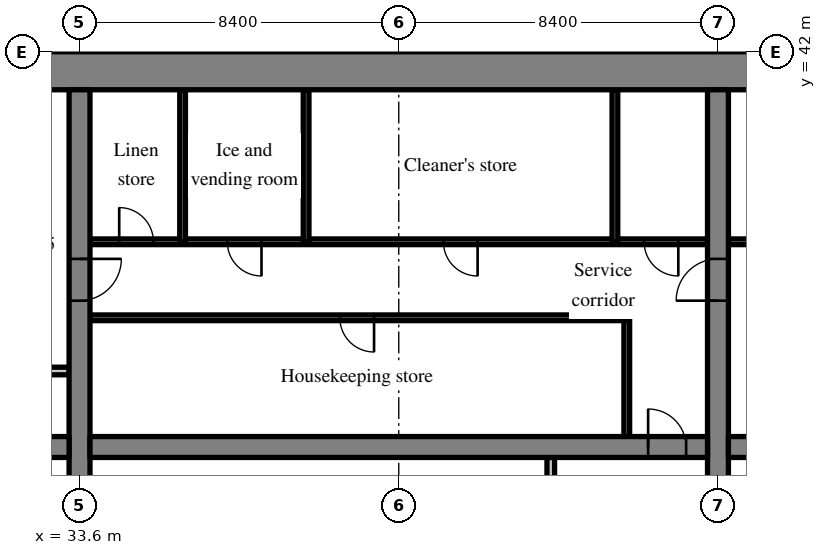
"""IFC4 building model, lengths in metres.
Left out: names, types, materials, properties, quantities, classifications, styles, units other than length and angle.
Written with IfcOpenShell. Run it as: python <this file> out.ifc"""

import sys

from ifc_helpers import new_model, si_unit, direction, frame, frame_2d, origin, place, context, subcontext, project, spatial, rectangle, extrude, source, transform, mapped, element, fill, save


model = new_model("IFC4")
c1 = context("Model", 3, precision=1e-05, world=origin(), true_north=direction((0.0, 1.0)))
c2 = subcontext(c1, "Body", "Model", "MODEL_VIEW")
j1 = project(units=[si_unit("LENGTHUNIT", "METRE"), si_unit("PLANEANGLEUNIT", "RADIAN")], contexts=[c1])
p1 = place(None, origin())
s1 = spatial("IfcSite", under=j1, at=p1, CompositionType="ELEMENT")
p2 = place(p1, origin())
s2 = spatial("IfcBuilding", under=s1, at=p2, CompositionType="ELEMENT")
p3 = place(p2, frame((0.0, 0.0, 50.6)))
s3 = spatial("IfcBuildingStorey", under=s2, at=p3, CompositionType="ELEMENT", Elevation=50.6)
m1 = source(origin(), c2, "Body", "SweptSolid", [
    extrude(rectangle(XDim=50.4, YDim=1.0, at=frame_2d((25.2, 0.0))), origin(), (0.0, 0.0, 1.0), 3.52),
])
p4 = place(p3, frame((25.2, 41.5, 0.0), z_axis=(0.0, 0.0, 1.0), x_axis=(1.0, 0.0, 0.0)))
e1 = element("IfcWall", 1, at=p4, inside=s3, PredefinedType="SHEAR", context=c2, shape_type="MappedRepresentation", body=[
    mapped(m1, transform((0.0, 0.0, 0.0), scale=1.0)),
])
m2 = source(origin(), c2, "Body", "SweptSolid", [
    extrude(rectangle(XDim=18.0, YDim=0.55, at=frame_2d((9.0, 0.0))), origin(), (0.0, 0.0, 1.0), 3.52),
])
p5 = place(p3, frame((33.6, 23.0, 0.0), z_axis=(0.0, 0.0, 1.0), x_axis=(0.0, 1.0, 0.0)))
e2 = element("IfcWall", 2, at=p5, inside=s3, PredefinedType="SHEAR", context=c2, shape_type="MappedRepresentation", body=[
    mapped(m2, transform((0.0, 0.0, 0.0), scale=1.0)),
])
m3 = source(origin(), c2, "Body", "SweptSolid", [
    extrude(rectangle(XDim=1.1, YDim=2.1, at=frame_2d((0.55, 1.05))), frame((0.0, 0.285, 0.0), z_axis=(0.0, -1.0, 0.0), x_axis=(1.0, 0.0, 0.0)), (0.0, 0.0, 1.0), 0.57),
])
p6 = place(p5, frame((12.45, 0.0, 0.0)))
e3 = element("IfcOpeningElement", 3, at=p6, cuts=e2, PredefinedType="OPENING", context=c2, shape_type="MappedRepresentation", body=[
    mapped(m3, transform((0.0, 0.0, 0.0), scale=1.0)),
])
p7 = place(p3, frame((50.4, 23.0, 0.0), z_axis=(0.0, 0.0, 1.0), x_axis=(0.0, 1.0, 0.0)))
e4 = element("IfcWall", 4, at=p7, inside=s3, PredefinedType="SHEAR", context=c2, shape_type="MappedRepresentation", body=[
    mapped(m2, transform((0.0, 0.0, 0.0), scale=1.0)),
])
p8 = place(p7, frame((12.45, 0.0, 0.0)))
e5 = element("IfcOpeningElement", 5, at=p8, cuts=e4, PredefinedType="OPENING", context=c2, shape_type="MappedRepresentation", body=[
    mapped(m3, transform((0.0, 0.0, 0.0), scale=1.0)),
])
m4 = source(origin(), c2, "Body", "SweptSolid", [
    extrude(rectangle(XDim=7.125, YDim=0.55, at=frame_2d((3.562, 0.0))), origin(), (0.0, 0.0, 1.0), 3.52),
])
p9 = place(p3, frame((26.2, 31.6, 0.0), z_axis=(0.0, 0.0, 1.0), x_axis=(1.0, 0.0, 0.0)))
e6 = element("IfcWall", 6, at=p9, inside=s3, PredefinedType="SHEAR", context=c2, shape_type="MappedRepresentation", body=[
    mapped(m4, transform((0.0, 0.0, 0.0), scale=1.0)),
])
p10 = place(p9, frame((5.488, 0.0, 0.0)))
e7 = element("IfcOpeningElement", 7, at=p10, cuts=e6, PredefinedType="OPENING", context=c2, shape_type="MappedRepresentation", body=[
    mapped(m3, transform((0.0, 0.0, 0.0), scale=1.0)),
])
m5 = source(origin(), c2, "Body", "SweptSolid", [
    extrude(rectangle(XDim=16.25, YDim=0.55, at=frame_2d((8.125, 0.0))), origin(), (0.0, 0.0, 1.0), 3.52),
])
p11 = place(p3, frame((33.875, 31.6, 0.0), z_axis=(0.0, 0.0, 1.0), x_axis=(1.0, 0.0, 0.0)))
e8 = element("IfcWall", 8, at=p11, inside=s3, PredefinedType="SHEAR", context=c2, shape_type="MappedRepresentation", body=[
    mapped(m5, transform((0.0, 0.0, 0.0), scale=1.0)),
])
m6 = source(origin(), c2, "Body", "SweptSolid", [
    extrude(rectangle(XDim=1.0, YDim=2.1, at=frame_2d((0.5, 1.05))), frame((0.0, 0.285, 0.0), z_axis=(0.0, -1.0, 0.0), x_axis=(1.0, 0.0, 0.0)), (0.0, 0.0, 1.0), 0.57),
])
p12 = place(p11, frame((14.687, 0.0, 0.0)))
e9 = element("IfcOpeningElement", 9, at=p12, cuts=e8, PredefinedType="OPENING", context=c2, shape_type="MappedRepresentation", body=[
    mapped(m6, transform((0.0, 0.0, 0.0), scale=1.0)),
])
p13 = place(p3, frame((50.675, 31.6, 0.0), z_axis=(0.0, 0.0, 1.0), x_axis=(1.0, 0.0, 0.0)))
e10 = element("IfcWall", 10, at=p13, inside=s3, PredefinedType="SHEAR", context=c2, shape_type="MappedRepresentation", body=[
    mapped(m5, transform((0.0, 0.0, 0.0), scale=1.0)),
])
p14 = place(p13, frame((0.562, 0.0, 0.0)))
e11 = element("IfcOpeningElement", 11, at=p14, cuts=e10, PredefinedType="OPENING", context=c2, shape_type="MappedRepresentation", body=[
    mapped(m6, transform((0.0, 0.0, 0.0), scale=1.0)),
])
m7 = source(origin(), c2, "Body", "SweptSolid", [
    extrude(rectangle(XDim=2.525, YDim=0.2, at=frame_2d((1.262, 0.0))), origin(), (0.0, 0.0, 1.0), 3.52),
])
p15 = place(p3, frame((46.0, 28.8, 0.0), z_axis=(0.0, 0.0, 1.0), x_axis=(0.0, 1.0, 0.0)))
e12 = element("IfcWall", 12, at=p15, inside=s3, PredefinedType="SOLIDWALL", context=c2, shape_type="MappedRepresentation", body=[
    mapped(m7, transform((0.0, 0.0, 0.0), scale=1.0)),
])
m8 = source(origin(), c2, "Body", "SweptSolid", [
    extrude(rectangle(XDim=3.125, YDim=0.15, at=frame_2d((1.562, 0.0))), origin(), (0.0, 0.0, 1.0), 3.52),
])
p16 = place(p3, frame((48.0, 31.875, 0.0), z_axis=(0.0, 0.0, 1.0), x_axis=(0.0, 1.0, 0.0)))
e13 = element("IfcWall", 13, at=p16, inside=s3, PredefinedType="PARTITIONING", context=c2, shape_type="MappedRepresentation", body=[
    mapped(m8, transform((0.0, 0.0, 0.0), scale=1.0)),
])
m9 = source(origin(), c2, "Body", "SweptSolid", [
    extrude(rectangle(XDim=14.125, YDim=0.15, at=frame_2d((7.062, 0.0))), origin(), (0.0, 0.0, 1.0), 3.52),
])
p17 = place(p3, frame((33.875, 35.0, 0.0), z_axis=(0.0, 0.0, 1.0), x_axis=(1.0, 0.0, 0.0)))
e14 = element("IfcWall", 14, at=p17, inside=s3, PredefinedType="PARTITIONING", context=c2, shape_type="MappedRepresentation", body=[
    mapped(m9, transform((0.0, 0.0, 0.0), scale=1.0)),
])
m10 = source(origin(), c2, "Body", "SweptSolid", [
    extrude(rectangle(XDim=0.9, YDim=2.1, at=frame_2d((0.45, 1.05))), frame((0.0, 0.085, 0.0), z_axis=(0.0, -1.0, 0.0), x_axis=(1.0, 0.0, 0.0)), (0.0, 0.0, 1.0), 0.17),
])
p18 = place(p17, frame((6.575, 0.0, 0.0)))
e15 = element("IfcOpeningElement", 15, at=p18, cuts=e14, PredefinedType="OPENING", context=c2, shape_type="MappedRepresentation", body=[
    mapped(m10, transform((0.0, 0.0, 0.0), scale=1.0)),
])
m11 = source(origin(), c2, "Body", "SweptSolid", [
    extrude(rectangle(XDim=16.25, YDim=0.15, at=frame_2d((8.125, 0.0))), origin(), (0.0, 0.0, 1.0), 3.52),
])
p19 = place(p3, frame((33.875, 37.0, 0.0), z_axis=(0.0, 0.0, 1.0), x_axis=(1.0, 0.0, 0.0)))
e16 = element("IfcWall", 16, at=p19, inside=s3, PredefinedType="PARTITIONING", context=c2, shape_type="MappedRepresentation", body=[
    mapped(m11, transform((0.0, 0.0, 0.0), scale=1.0)),
])
p20 = place(p19, frame((0.769, 0.0, 0.0)))
e17 = element("IfcOpeningElement", 17, at=p20, cuts=e16, PredefinedType="OPENING", context=c2, shape_type="MappedRepresentation", body=[
    mapped(m10, transform((0.0, 0.0, 0.0), scale=1.0)),
])
p21 = place(p19, frame((3.613, 0.0, 0.0)))
e18 = element("IfcOpeningElement", 18, at=p21, cuts=e16, PredefinedType="OPENING", context=c2, shape_type="MappedRepresentation", body=[
    mapped(m10, transform((0.0, 0.0, 0.0), scale=1.0)),
])
p22 = place(p19, frame((9.3, 0.0, 0.0)))
e19 = element("IfcOpeningElement", 19, at=p22, cuts=e16, PredefinedType="OPENING", context=c2, shape_type="MappedRepresentation", body=[
    mapped(m10, transform((0.0, 0.0, 0.0), scale=1.0)),
])
p23 = place(p19, frame((14.581, 0.0, 0.0)))
e20 = element("IfcOpeningElement", 20, at=p23, cuts=e16, PredefinedType="OPENING", context=c2, shape_type="MappedRepresentation", body=[
    mapped(m10, transform((0.0, 0.0, 0.0), scale=1.0)),
])
m12 = source(origin(), c2, "Body", "SweptSolid", [
    extrude(rectangle(XDim=4.0, YDim=0.15, at=frame_2d((2.0, 0.0))), origin(), (0.0, 0.0, 1.0), 3.52),
])
for number, where, z_axis, x_axis in (
    (21, (36.312, 37.0, 0.0), (0.0, 0.0, 1.0), (0.0, 1.0, 0.0)),
    (22, (39.562, 37.0, 0.0), (0.0, 0.0, 1.0), (0.0, 1.0, 0.0)),
    (23, (47.688, 37.0, 0.0), (0.0, 0.0, 1.0), (0.0, 1.0, 0.0)),
):
    element("IfcWall", number, at=place(p3, frame(where, z_axis=z_axis, x_axis=x_axis)), inside=s3, PredefinedType="PARTITIONING", context=c2, shape_type="MappedRepresentation", body=[
        mapped(m12, transform((0.0, 0.0, 0.0), scale=1.0)),
    ])
p24 = place(p3, frame((66.925, 37.0, 0.0), z_axis=(0.0, 0.0, 1.0), x_axis=(-1.0, 0.0, 0.0)))
e24 = element("IfcWall", 24, at=p24, inside=s3, PredefinedType="PARTITIONING", context=c2, shape_type="MappedRepresentation", body=[
    mapped(m11, transform((0.0, 0.0, 0.0), scale=1.0)),
])
p25 = place(p24, frame((6.456, 0.0, 0.0)))
e25 = element("IfcOpeningElement", 25, at=p25, cuts=e24, PredefinedType="OPENING", context=c2, shape_type="MappedRepresentation", body=[
    mapped(m10, transform((0.0, 0.0, 0.0), scale=1.0)),
])
p26 = place(p24, frame((14.581, 0.0, 0.0)))
e26 = element("IfcOpeningElement", 26, at=p26, cuts=e24, PredefinedType="OPENING", context=c2, shape_type="MappedRepresentation", body=[
    mapped(m10, transform((0.0, 0.0, 0.0), scale=1.0)),
])
m13 = source(origin(), c2, "Body", "SweptSolid", [
    extrude(rectangle(XDim=2.175, YDim=0.2, at=frame_2d((1.087, 0.0))), origin(), (0.0, 0.0, 1.0), 3.52),
])
p27 = place(p3, frame((31.15, 33.6, 0.0), z_axis=(0.0, 0.0, 1.0), x_axis=(1.0, 0.0, 0.0)))
e27 = element("IfcWall", 27, at=p27, inside=s3, PredefinedType="SOLIDWALL", context=c2, shape_type="MappedRepresentation", body=[
    mapped(m13, transform((0.0, 0.0, 0.0), scale=1.0)),
])
m14 = source(origin(), c2, "Body", "SweptSolid", [
    extrude(rectangle(XDim=1.0, YDim=2.1, at=frame_2d((0.5, 1.05))), frame((0.0, 0.025, 0.0), z_axis=(0.0, -1.0, 0.0), x_axis=(1.0, 0.0, 0.0)), (0.0, 0.0, 1.0), 0.05),
])
p28 = place(p12, origin())
e28 = element("IfcDoor", 28, at=p28, inside=s3, OperationType="SINGLE_SWING_LEFT", PredefinedType="DOOR", context=c2, shape_type="MappedRepresentation", body=[
    mapped(m14, transform((0.0, 0.0, 0.0), scale=1.0)),
])
fill(e9, e28)
m15 = source(origin(), c2, "Body", "SweptSolid", [
    extrude(rectangle(XDim=0.9, YDim=2.1, at=frame_2d((0.45, 1.05))), frame((0.0, 0.025, 0.0), z_axis=(0.0, -1.0, 0.0), x_axis=(1.0, 0.0, 0.0)), (0.0, 0.0, 1.0), 0.05),
])
p29 = place(p18, origin())
e29 = element("IfcDoor", 29, at=p29, inside=s3, OperationType="SINGLE_SWING_RIGHT", PredefinedType="DOOR", context=c2, shape_type="MappedRepresentation", body=[
    mapped(m15, transform((0.0, 0.0, 0.0), scale=1.0)),
])
fill(e15, e29)
p30 = place(p20, origin())
e30 = element("IfcDoor", 30, at=p30, inside=s3, OperationType="SINGLE_SWING_LEFT", PredefinedType="DOOR", context=c2, shape_type="MappedRepresentation", body=[
    mapped(m15, transform((0.0, 0.0, 0.0), scale=1.0)),
])
fill(e17, e30)
p31 = place(p21, origin())
e31 = element("IfcDoor", 31, at=p31, inside=s3, OperationType="SINGLE_SWING_RIGHT", PredefinedType="DOOR", context=c2, shape_type="MappedRepresentation", body=[
    mapped(m15, transform((0.0, 0.0, 0.0), scale=1.0)),
])
fill(e18, e31)
p32 = place(p22, origin())
e32 = element("IfcDoor", 32, at=p32, inside=s3, OperationType="SINGLE_SWING_RIGHT", PredefinedType="DOOR", context=c2, shape_type="MappedRepresentation", body=[
    mapped(m15, transform((0.0, 0.0, 0.0), scale=1.0)),
])
fill(e19, e32)
p33 = place(p23, origin())
e33 = element("IfcDoor", 33, at=p33, inside=s3, OperationType="SINGLE_SWING_RIGHT", PredefinedType="DOOR", context=c2, shape_type="MappedRepresentation", body=[
    mapped(m15, transform((0.0, 0.0, 0.0), scale=1.0)),
])
fill(e20, e33)
m16 = source(origin(), c2, "Body", "SweptSolid", [
    extrude(rectangle(XDim=1.1, YDim=2.1, at=frame_2d((0.55, 1.05))), frame((0.0, 0.025, 0.0), z_axis=(0.0, -1.0, 0.0), x_axis=(1.0, 0.0, 0.0)), (0.0, 0.0, 1.0), 0.05),
])
p34 = place(p6, origin())
e34 = element("IfcDoor", 34, at=p34, inside=s3, OperationType="SINGLE_SWING_RIGHT", PredefinedType="DOOR", context=c2, shape_type="MappedRepresentation", body=[
    mapped(m16, transform((0.0, 0.0, 0.0), scale=1.0)),
])
fill(e3, e34)
p35 = place(p8, origin())
e35 = element("IfcDoor", 35, at=p35, inside=s3, OperationType="SINGLE_SWING_LEFT", PredefinedType="DOOR", context=c2, shape_type="MappedRepresentation", body=[
    mapped(m16, transform((0.0, 0.0, 0.0), scale=1.0)),
])
fill(e5, e35)
save(model, sys.argv[1])
